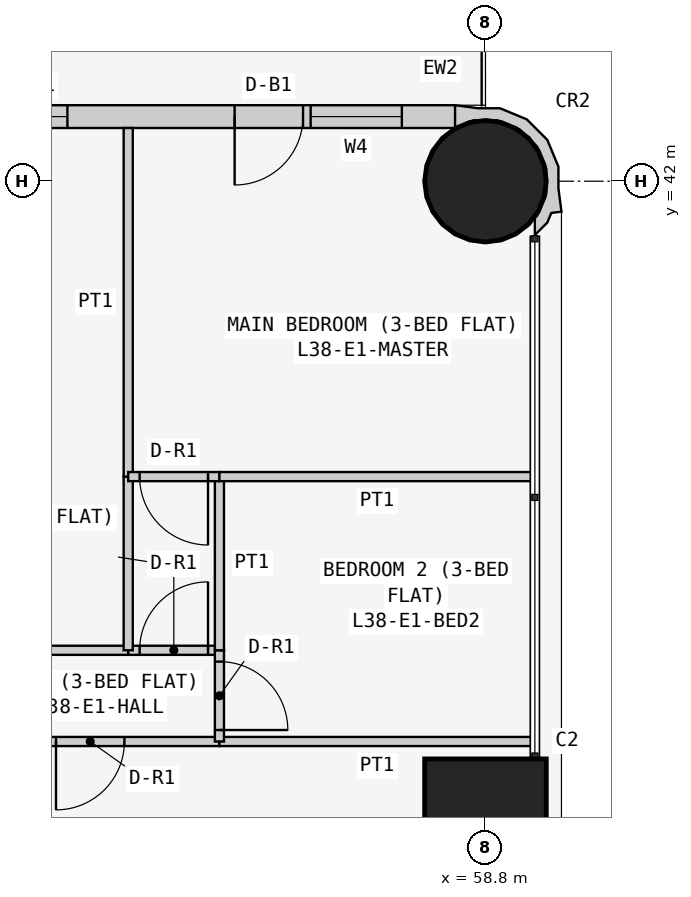
"""IFC4 building model, lengths in metres.
Left out: names, types, materials, properties, quantities, classifications, styles, units other than length and angle.
Written with IfcOpenShell. Run it as: python <this file> out.ifc"""

import sys

from ifc_helpers import new_model, si_unit, direction, frame, frame_2d, origin, origin_2d, place, context, subcontext, project, spatial, polyline, rectangle, circle, outline, extrude, element, fill, save


model = new_model("IFC4")
c1 = context("Model", 3, precision=1e-05, world=origin(), true_north=direction((0.0, 1.0)))
c2 = subcontext(c1, "Body", "Model", "MODEL_VIEW")
j1 = project(units=[si_unit("LENGTHUNIT", "METRE"), si_unit("PLANEANGLEUNIT", "RADIAN")], contexts=[c1])
p1 = place(None, origin())
s1 = spatial("IfcSite", under=j1, at=p1, CompositionType="ELEMENT")
p2 = place(p1, origin())
s2 = spatial("IfcBuilding", under=s1, at=p2, CompositionType="ELEMENT")
p3 = place(p2, frame((0.0, 0.0, 148.5)))
s3 = spatial("IfcBuildingStorey", under=s2, at=p3, CompositionType="ELEMENT", Elevation=148.5)
p4 = place(p3, frame((58.8, 33.6, 0.0), z_axis=(0.0, 0.0, 1.0), x_axis=(1.0, 0.0, 0.0)))
e1 = element("IfcColumn", 1, at=p4, inside=s3, PredefinedType="COLUMN", context=c2, shape_type="SweptSolid", body=[
    extrude(rectangle(XDim=1.6, YDim=1.6, at=origin_2d()), origin(), (0.0, 0.0, 1.0), 3.6),
])
p5 = place(p3, frame((58.8, 42.0, 0.0), z_axis=(0.0, 0.0, 1.0), x_axis=(1.0, 0.0, 0.0)))
e2 = element("IfcColumn", 2, at=p5, inside=s3, PredefinedType="COLUMN", context=c2, shape_type="SweptSolid", body=[
    extrude(circle(Radius=0.8, at=origin_2d()), origin(), (0.0, 0.0, 1.0), 3.6),
])
p6 = place(p3, frame((58.4, 42.85, 0.0), z_axis=(0.0, 0.0, 1.0), x_axis=(-1.0, 0.0, 0.0)))
e3 = element("IfcWall", 3, at=p6, inside=s3, PredefinedType="SOLIDWALL", context=c2, shape_type="SweptSolid", body=[
    extrude(rectangle(XDim=15.7, YDim=0.3, at=frame_2d((7.85, 0.0))), origin(), (0.0, 0.0, 1.0), 3.45),
])
p7 = place(p6, frame((12.4, 0.0, 0.9)))
e4 = element("IfcOpeningElement", 4, at=p7, cuts=e3, PredefinedType="OPENING", context=c2, shape_type="SweptSolid", body=[
    extrude(rectangle(XDim=1.8, YDim=1.5, at=frame_2d((0.9, 0.75))), frame((0.0, 0.16, 0.0), z_axis=(0.0, -1.0, 0.0), x_axis=(1.0, 0.0, 0.0)), (0.0, 0.0, 1.0), 0.32),
])
p8 = place(p6, frame((9.55, 0.0, 1.5)))
e5 = element("IfcOpeningElement", 5, at=p8, cuts=e3, PredefinedType="OPENING", context=c2, shape_type="SweptSolid", body=[
    extrude(rectangle(XDim=0.9, YDim=0.7, at=frame_2d((0.45, 0.35))), frame((0.0, 0.16, 0.0), z_axis=(0.0, -1.0, 0.0), x_axis=(1.0, 0.0, 0.0)), (0.0, 0.0, 1.0), 0.32),
])
p9 = place(p6, frame((5.1, 0.0, 0.9)))
e6 = element("IfcOpeningElement", 6, at=p9, cuts=e3, PredefinedType="OPENING", context=c2, shape_type="SweptSolid", body=[
    extrude(rectangle(XDim=1.8, YDim=1.5, at=frame_2d((0.9, 0.75))), frame((0.0, 0.16, 0.0), z_axis=(0.0, -1.0, 0.0), x_axis=(1.0, 0.0, 0.0)), (0.0, 0.0, 1.0), 0.32),
])
p10 = place(p6, frame((2.0, 0.0, 0.0)))
e7 = element("IfcOpeningElement", 7, at=p10, cuts=e3, PredefinedType="OPENING", context=c2, shape_type="SweptSolid", body=[
    extrude(rectangle(XDim=0.9, YDim=2.4, at=frame_2d((0.45, 1.2))), frame((0.0, 0.16, 0.0), z_axis=(0.0, -1.0, 0.0), x_axis=(1.0, 0.0, 0.0)), (0.0, 0.0, 1.0), 0.32),
])
p11 = place(p6, frame((0.7, 0.0, 0.9)))
e8 = element("IfcOpeningElement", 8, at=p11, cuts=e3, PredefinedType="OPENING", context=c2, shape_type="SweptSolid", body=[
    extrude(rectangle(XDim=1.2, YDim=1.5, at=frame_2d((0.6, 0.75))), frame((0.0, 0.16, 0.0), z_axis=(0.0, -1.0, 0.0), x_axis=(1.0, 0.0, 0.0)), (0.0, 0.0, 1.0), 0.32),
])
p12 = place(p3, frame((59.395, 41.352, 0.0), z_axis=(0.0, 0.0, 1.0), x_axis=(0.93923434088, 0.343276641956, 0.0)))
e9 = element("IfcWall", 9, at=p12, inside=s3, PredefinedType="SOLIDWALL", context=c2, shape_type="SweptSolid", body=[
    extrude(outline(polyline([(0.532, 0.393), (0.631, 0.663), (0.614, 1.044), (0.453, 1.391), (0.172, 1.649), (-0.097, 1.748), (-0.369, 1.89), (-0.509, 1.621), (-0.491, 1.615), (-0.479, 1.609), (-0.211, 1.62), (0.088, 1.511), (0.323, 1.295), (0.457, 1.006), (0.47, 0.688), (0.361, 0.389), (0.145, 0.154), (0.108, 0.136), (0.031, -0.075), (0.241, 0.023), (0.333, 0.124), (0.465, 0.094), (0.532, 0.393)])), origin(), (0.0, 0.0, 1.0), 3.45),
])
p13 = place(p3, frame((55.3, 34.629, 0.0), z_axis=(0.0, 0.0, 1.0), x_axis=(-1.0, 0.0, 0.0)))
e10 = element("IfcWall", 10, at=p13, inside=s3, PredefinedType="PARTITIONING", context=c2, shape_type="SweptSolid", body=[
    extrude(rectangle(XDim=2.7, YDim=0.12, at=frame_2d((1.35, 0.0))), origin(), (0.0, 0.0, 1.0), 3.45),
])
p14 = place(p13, frame((1.25, 0.0, 0.0)))
e11 = element("IfcOpeningElement", 11, at=p14, cuts=e10, PredefinedType="OPENING", context=c2, shape_type="SweptSolid", body=[
    extrude(rectangle(XDim=0.9, YDim=2.1, at=frame_2d((0.45, 1.05))), frame((0.0, 0.07, 0.0), z_axis=(0.0, -1.0, 0.0), x_axis=(1.0, 0.0, 0.0)), (0.0, 0.0, 1.0), 0.14),
])
p15 = place(p3, frame((59.45, 34.629, 0.0), z_axis=(0.0, 0.0, 1.0), x_axis=(-1.0, 0.0, 0.0)))
e12 = element("IfcWall", 12, at=p15, inside=s3, PredefinedType="PARTITIONING", context=c2, shape_type="SweptSolid", body=[
    extrude(rectangle(XDim=4.15, YDim=0.12, at=frame_2d((2.075, 0.0))), origin(), (0.0, 0.0, 1.0), 3.45),
])
p16 = place(p3, frame((54.1, 35.829, 0.0), z_axis=(0.0, 0.0, 1.0), x_axis=(-1.0, 0.0, 0.0)))
e13 = element("IfcWall", 13, at=p16, inside=s3, PredefinedType="PARTITIONING", context=c2, shape_type="SweptSolid", body=[
    extrude(rectangle(XDim=4.9, YDim=0.12, at=frame_2d((2.45, 0.0))), origin(), (0.0, 0.0, 1.0), 3.45),
])
p17 = place(p16, frame((1.65, 0.0, 0.0)))
e14 = element("IfcOpeningElement", 14, at=p17, cuts=e13, PredefinedType="OPENING", context=c2, shape_type="SweptSolid", body=[
    extrude(rectangle(XDim=0.9, YDim=2.1, at=frame_2d((0.45, 1.05))), frame((0.0, 0.07, 0.0), z_axis=(0.0, -1.0, 0.0), x_axis=(1.0, 0.0, 0.0)), (0.0, 0.0, 1.0), 0.14),
])
p18 = place(p3, frame((55.3, 35.829, 0.0), z_axis=(0.0, 0.0, 1.0), x_axis=(-1.0, 0.0, 0.0)))
e15 = element("IfcWall", 15, at=p18, inside=s3, PredefinedType="PARTITIONING", context=c2, shape_type="SweptSolid", body=[
    extrude(rectangle(XDim=1.2, YDim=0.12, at=frame_2d((0.6, 0.0))), origin(), (0.0, 0.0, 1.0), 3.45),
])
p19 = place(p18, frame((0.15, 0.0, 0.0)))
e16 = element("IfcOpeningElement", 16, at=p19, cuts=e15, PredefinedType="OPENING", context=c2, shape_type="SweptSolid", body=[
    extrude(rectangle(XDim=0.9, YDim=2.1, at=frame_2d((0.45, 1.05))), frame((0.0, 0.07, 0.0), z_axis=(0.0, -1.0, 0.0), x_axis=(1.0, 0.0, 0.0)), (0.0, 0.0, 1.0), 0.14),
])
p20 = place(p3, frame((55.3, 34.629, 0.0), z_axis=(0.0, 0.0, 1.0), x_axis=(0.0, 1.0, 0.0)))
e17 = element("IfcWall", 17, at=p20, inside=s3, PredefinedType="PARTITIONING", context=c2, shape_type="SweptSolid", body=[
    extrude(rectangle(XDim=1.2, YDim=0.12, at=frame_2d((0.6, 0.0))), origin(), (0.0, 0.0, 1.0), 3.45),
])
p21 = place(p20, frame((0.151, 0.0, 0.0)))
e18 = element("IfcOpeningElement", 18, at=p21, cuts=e17, PredefinedType="OPENING", context=c2, shape_type="SweptSolid", body=[
    extrude(rectangle(XDim=0.9, YDim=2.1, at=frame_2d((0.45, 1.05))), frame((0.0, 0.07, 0.0), z_axis=(0.0, -1.0, 0.0), x_axis=(1.0, 0.0, 0.0)), (0.0, 0.0, 1.0), 0.14),
])
p22 = place(p3, frame((54.1, 35.829, 0.0), z_axis=(0.0, 0.0, 1.0), x_axis=(0.0, 1.0, 0.0)))
e19 = element("IfcWall", 19, at=p22, inside=s3, PredefinedType="PARTITIONING", context=c2, shape_type="SweptSolid", body=[
    extrude(rectangle(XDim=2.285, YDim=0.12, at=frame_2d((1.143, 0.0))), origin(), (0.0, 0.0, 1.0), 3.45),
])
p23 = place(p3, frame((54.1, 38.114, 0.0), z_axis=(0.0, 0.0, 1.0), x_axis=(0.0, 1.0, 0.0)))
e20 = element("IfcWall", 20, at=p23, inside=s3, PredefinedType="PARTITIONING", context=c2, shape_type="SweptSolid", body=[
    extrude(rectangle(XDim=4.586, YDim=0.12, at=frame_2d((2.293, 0.0))), origin(), (0.0, 0.0, 1.0), 3.45),
])
p24 = place(p3, frame((55.3, 35.829, 0.0), z_axis=(0.0, 0.0, 1.0), x_axis=(0.0, 1.0, 0.0)))
e21 = element("IfcWall", 21, at=p24, inside=s3, PredefinedType="PARTITIONING", context=c2, shape_type="SweptSolid", body=[
    extrude(rectangle(XDim=2.285, YDim=0.12, at=frame_2d((1.143, 0.0))), origin(), (0.0, 0.0, 1.0), 3.45),
])
p25 = place(p3, frame((55.3, 38.114, 0.0), z_axis=(0.0, 0.0, 1.0), x_axis=(-1.0, 0.0, 0.0)))
e22 = element("IfcWall", 22, at=p25, inside=s3, PredefinedType="PARTITIONING", context=c2, shape_type="SweptSolid", body=[
    extrude(rectangle(XDim=1.2, YDim=0.12, at=frame_2d((0.6, 0.0))), origin(), (0.0, 0.0, 1.0), 3.45),
])
p26 = place(p25, frame((0.15, 0.0, 0.0)))
e23 = element("IfcOpeningElement", 23, at=p26, cuts=e22, PredefinedType="OPENING", context=c2, shape_type="SweptSolid", body=[
    extrude(rectangle(XDim=0.9, YDim=2.1, at=frame_2d((0.45, 1.05))), frame((0.0, 0.07, 0.0), z_axis=(0.0, -1.0, 0.0), x_axis=(1.0, 0.0, 0.0)), (0.0, 0.0, 1.0), 0.14),
])
p27 = place(p3, frame((59.45, 38.114, 0.0), z_axis=(0.0, 0.0, 1.0), x_axis=(-1.0, 0.0, 0.0)))
e24 = element("IfcWall", 24, at=p27, inside=s3, PredefinedType="PARTITIONING", context=c2, shape_type="SweptSolid", body=[
    extrude(rectangle(XDim=4.15, YDim=0.12, at=frame_2d((2.075, 0.0))), origin(), (0.0, 0.0, 1.0), 3.45),
])
p28 = place(p9, origin())
e25 = element("IfcWindow", 25, at=p28, inside=s3, PartitioningType="SINGLE_PANEL", PredefinedType="WINDOW", context=c2, shape_type="SweptSolid", body=[
    extrude(rectangle(XDim=1.8, YDim=1.5, at=frame_2d((0.9, 0.75))), frame((0.0, 0.03, 0.0), z_axis=(0.0, -1.0, 0.0), x_axis=(1.0, 0.0, 0.0)), (0.0, 0.0, 1.0), 0.06),
])
fill(e6, e25)
p29 = place(p10, origin())
e26 = element("IfcDoor", 26, at=p29, inside=s3, OperationType="SINGLE_SWING_RIGHT", PredefinedType="DOOR", context=c2, shape_type="SweptSolid", body=[
    extrude(rectangle(XDim=0.9, YDim=2.4, at=frame_2d((0.45, 1.2))), frame((0.0, 0.025, 0.0), z_axis=(0.0, -1.0, 0.0), x_axis=(1.0, 0.0, 0.0)), (0.0, 0.0, 1.0), 0.05),
])
fill(e7, e26)
p30 = place(p11, origin())
e27 = element("IfcWindow", 27, at=p30, inside=s3, PartitioningType="SINGLE_PANEL", PredefinedType="WINDOW", context=c2, shape_type="SweptSolid", body=[
    extrude(rectangle(XDim=1.2, YDim=1.5, at=frame_2d((0.6, 0.75))), frame((0.0, 0.03, 0.0), z_axis=(0.0, -1.0, 0.0), x_axis=(1.0, 0.0, 0.0)), (0.0, 0.0, 1.0), 0.06),
])
fill(e8, e27)
p31 = place(p14, origin())
e28 = element("IfcDoor", 28, at=p31, inside=s3, OperationType="SINGLE_SWING_RIGHT", PredefinedType="DOOR", context=c2, shape_type="SweptSolid", body=[
    extrude(rectangle(XDim=0.9, YDim=2.1, at=frame_2d((0.45, 1.05))), frame((0.0, 0.025, 0.0), z_axis=(0.0, -1.0, 0.0), x_axis=(1.0, 0.0, 0.0)), (0.0, 0.0, 1.0), 0.05),
])
fill(e11, e28)
p32 = place(p19, frame((0.9, 0.0, 0.0), z_axis=(0.0, 0.0, 1.0), x_axis=(-1.0, 0.0, 0.0)))
e29 = element("IfcDoor", 29, at=p32, inside=s3, OperationType="SINGLE_SWING_RIGHT", PredefinedType="DOOR", context=c2, shape_type="SweptSolid", body=[
    extrude(rectangle(XDim=0.9, YDim=2.1, at=frame_2d((0.45, 1.05))), frame((0.0, 0.025, 0.0), z_axis=(0.0, -1.0, 0.0), x_axis=(1.0, 0.0, 0.0)), (0.0, 0.0, 1.0), 0.05),
])
fill(e16, e29)
p33 = place(p26, origin())
e30 = element("IfcDoor", 30, at=p33, inside=s3, OperationType="SINGLE_SWING_LEFT", PredefinedType="DOOR", context=c2, shape_type="SweptSolid", body=[
    extrude(rectangle(XDim=0.9, YDim=2.1, at=frame_2d((0.45, 1.05))), frame((0.0, 0.025, 0.0), z_axis=(0.0, -1.0, 0.0), x_axis=(1.0, 0.0, 0.0)), (0.0, 0.0, 1.0), 0.05),
])
fill(e23, e30)
p34 = place(p21, frame((0.9, 0.0, 0.0), z_axis=(0.0, 0.0, 1.0), x_axis=(-1.0, 0.0, 0.0)))
e31 = element("IfcDoor", 31, at=p34, inside=s3, OperationType="SINGLE_SWING_RIGHT", PredefinedType="DOOR", context=c2, shape_type="SweptSolid", body=[
    extrude(rectangle(XDim=0.9, YDim=2.1, at=frame_2d((0.45, 1.05))), frame((0.0, 0.025, 0.0), z_axis=(0.0, -1.0, 0.0), x_axis=(1.0, 0.0, 0.0)), (0.0, 0.0, 1.0), 0.05),
])
fill(e18, e31)
save(model, sys.argv[1])
